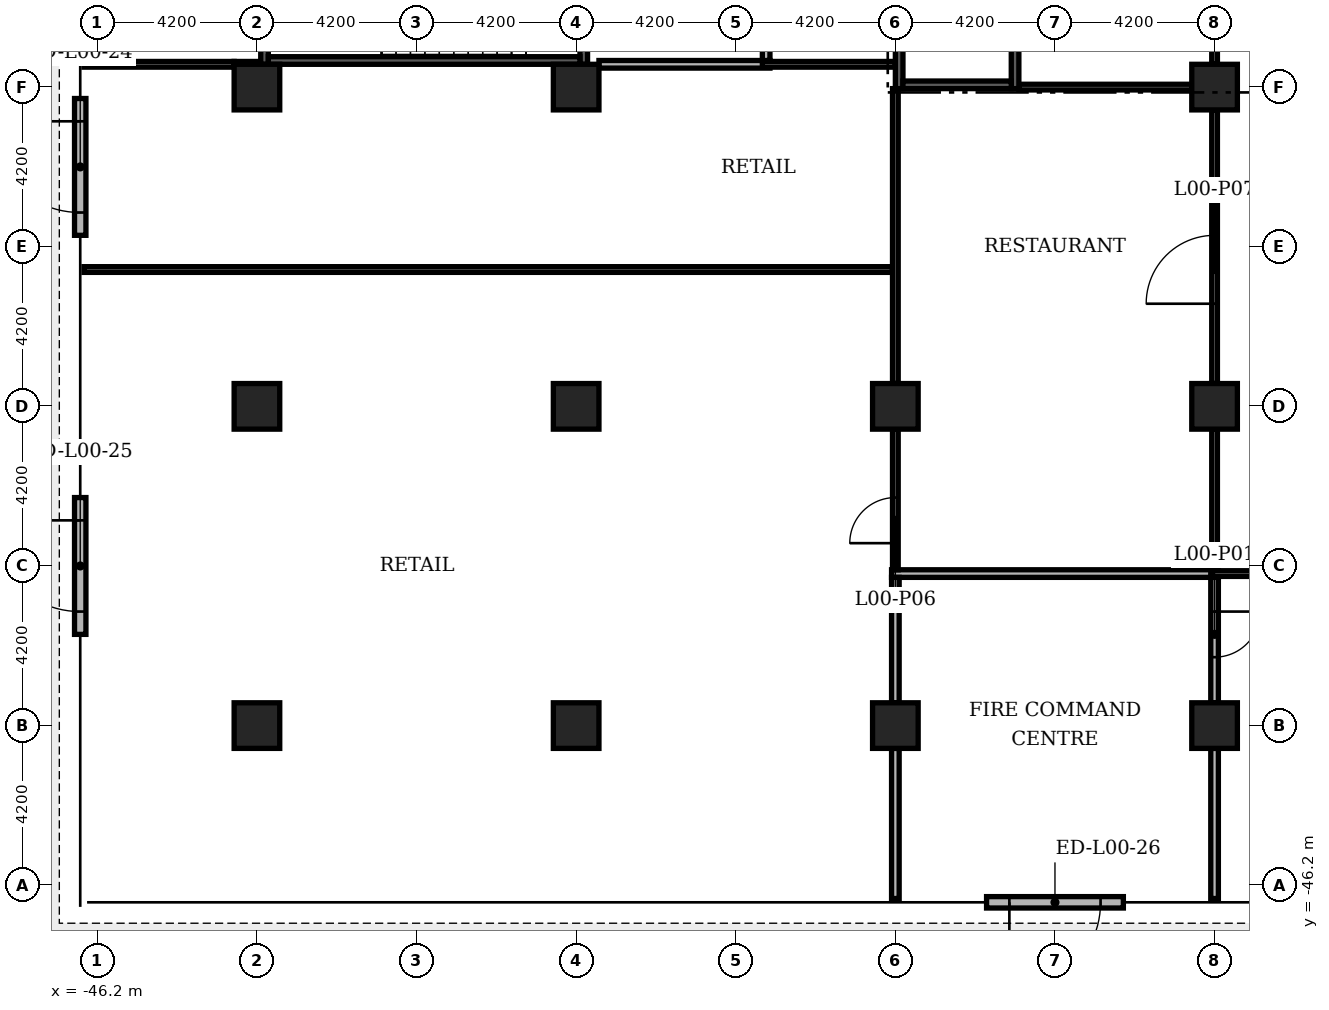
"""IFC4 building model, lengths in metres.
Left out: names, types, materials, properties, quantities, classifications, styles, units other than length and angle.
Written with IfcOpenShell. Run it as: python <this file> out.ifc"""

import sys

from ifc_helpers import new_model, si_unit, direction, frame, frame_2d, origin, origin_2d, place, context, subcontext, project, spatial, rectangle, extrude, element, fill, save


model = new_model("IFC4")
c1 = context("Model", 3, precision=1e-05, world=origin(), true_north=direction((0.0, 1.0)))
c2 = subcontext(c1, "Body", "Model", "MODEL_VIEW")
j1 = project(units=[si_unit("LENGTHUNIT", "METRE"), si_unit("PLANEANGLEUNIT", "RADIAN")], contexts=[c1])
p1 = place(None, origin())
s1 = spatial("IfcSite", under=j1, at=p1, CompositionType="ELEMENT")
p2 = place(p1, origin())
s2 = spatial("IfcBuilding", under=s1, at=p2, CompositionType="ELEMENT")
p3 = place(p2, origin())
s3 = spatial("IfcBuildingStorey", under=s2, at=p3, CompositionType="ELEMENT", Elevation=0.0)
for number, where, z_axis, x_axis in (
    (1, (-16.8, -25.2, 0.0), (0.0, 0.0, 1.0), (1.0, 0.0, 0.0)),
    (2, (-16.8, -33.6, 0.0), (0.0, 0.0, 1.0), (1.0, 0.0, 0.0)),
    (3, (-16.8, -42.0, 0.0), (0.0, 0.0, 1.0), (1.0, 0.0, 0.0)),
    (4, (-25.2, -33.6, 0.0), (0.0, 0.0, 1.0), (1.0, 0.0, 0.0)),
    (5, (-25.2, -42.0, 0.0), (0.0, 0.0, 1.0), (1.0, 0.0, 0.0)),
    (6, (-33.6, -25.2, 0.0), (0.0, 0.0, 1.0), (1.0, 0.0, 0.0)),
    (7, (-33.6, -33.6, 0.0), (0.0, 0.0, 1.0), (1.0, 0.0, 0.0)),
    (8, (-33.6, -42.0, 0.0), (0.0, 0.0, 1.0), (1.0, 0.0, 0.0)),
    (9, (-42.0, -25.2, 0.0), (0.0, 0.0, 1.0), (1.0, 0.0, 0.0)),
    (10, (-42.0, -33.6, 0.0), (0.0, 0.0, 1.0), (1.0, 0.0, 0.0)),
    (11, (-42.0, -42.0, 0.0), (0.0, 0.0, 1.0), (1.0, 0.0, 0.0)),
):
    element("IfcColumn", number, at=place(p3, frame(where, z_axis=z_axis, x_axis=x_axis)), inside=s3, PredefinedType="COLUMN", context=c2, shape_type="SweptSolid", body=[
        extrude(rectangle(XDim=1.2, YDim=1.2, at=origin_2d()), origin(), (0.0, 0.0, 1.0), 7.2),
    ])
p4 = place(p3, frame((-46.65, -25.5, 0.0), z_axis=(0.0, 0.0, 1.0), x_axis=(0.0, -1.0, 0.0)))
e12 = element("IfcWall", 12, at=p4, inside=s3, PredefinedType="STANDARD", context=c2, shape_type="SweptSolid", body=[
    extrude(rectangle(XDim=3.6, YDim=0.3, at=frame_2d((1.8, 0.0))), origin(), (0.0, 0.0, 1.0), 6.78),
])
p5 = place(p4, frame((0.6, 0.0, 0.0)))
e13 = element("IfcOpeningElement", 13, at=p5, cuts=e12, PredefinedType="OPENING", context=c2, shape_type="SweptSolid", body=[
    extrude(rectangle(XDim=2.4, YDim=2.4, at=frame_2d((1.2, 1.2))), frame((0.0, 0.16, 0.0), z_axis=(0.0, -1.0, 0.0), x_axis=(1.0, 0.0, 0.0)), (0.0, 0.0, 1.0), 0.32),
])
p6 = place(p3, frame((-46.65, -36.0, 0.0), z_axis=(0.0, 0.0, 1.0), x_axis=(0.0, -1.0, 0.0)))
e14 = element("IfcWall", 14, at=p6, inside=s3, PredefinedType="STANDARD", context=c2, shape_type="SweptSolid", body=[
    extrude(rectangle(XDim=3.6, YDim=0.3, at=frame_2d((1.8, 0.0))), origin(), (0.0, 0.0, 1.0), 6.78),
])
p7 = place(p6, frame((0.6, 0.0, 0.0)))
e15 = element("IfcOpeningElement", 15, at=p7, cuts=e14, PredefinedType="OPENING", context=c2, shape_type="SweptSolid", body=[
    extrude(rectangle(XDim=2.4, YDim=2.4, at=frame_2d((1.2, 1.2))), frame((0.0, 0.16, 0.0), z_axis=(0.0, -1.0, 0.0), x_axis=(1.0, 0.0, 0.0)), (0.0, 0.0, 1.0), 0.32),
])
p8 = place(p3, frame((-22.8, -46.65, 0.0), z_axis=(0.0, 0.0, 1.0), x_axis=(1.0, 0.0, 0.0)))
e16 = element("IfcWall", 16, at=p8, inside=s3, PredefinedType="STANDARD", context=c2, shape_type="SweptSolid", body=[
    extrude(rectangle(XDim=3.6, YDim=0.3, at=frame_2d((1.8, 0.0))), origin(), (0.0, 0.0, 1.0), 6.78),
])
p9 = place(p8, frame((0.6, 0.0, 0.0)))
e17 = element("IfcOpeningElement", 17, at=p9, cuts=e16, PredefinedType="OPENING", context=c2, shape_type="SweptSolid", body=[
    extrude(rectangle(XDim=2.4, YDim=2.4, at=frame_2d((1.2, 1.2))), frame((0.0, 0.16, 0.0), z_axis=(0.0, -1.0, 0.0), x_axis=(1.0, 0.0, 0.0)), (0.0, 0.0, 1.0), 0.32),
])
p10 = place(p3, frame((-25.3, -38.0, 0.0), z_axis=(0.0, 0.0, 1.0), x_axis=(1.0, 0.0, 0.0)))
e18 = element("IfcWall", 18, at=p10, inside=s3, PredefinedType="PARTITIONING", context=c2, shape_type="SweptSolid", body=[
    extrude(rectangle(XDim=8.6, YDim=0.2, at=frame_2d((4.3, 0.0))), origin(), (0.0, 0.0, 1.0), 6.38),
])
p11 = place(p3, frame((-16.9, -38.0, 0.0), z_axis=(0.0, 0.0, 1.0), x_axis=(1.0, 0.0, 0.0)))
e19 = element("IfcWall", 19, at=p11, inside=s3, PredefinedType="PARTITIONING", context=c2, shape_type="SweptSolid", body=[
    extrude(rectangle(XDim=33.625, YDim=0.15, at=frame_2d((16.812, 0.0))), origin(), (0.0, 0.0, 1.0), 6.38),
])
p12 = place(p11, frame((7.7, 0.0, 0.0)))
e20 = element("IfcOpeningElement", 20, at=p12, cuts=e19, PredefinedType="OPENING", context=c2, shape_type="SweptSolid", body=[
    extrude(rectangle(XDim=2.4, YDim=2.4, at=frame_2d((1.2, 1.2))), frame((0.0, 0.085, 0.0), z_axis=(0.0, -1.0, 0.0), x_axis=(1.0, 0.0, 0.0)), (0.0, 0.0, 1.0), 0.17),
])
p13 = place(p11, frame((15.7, 0.0, 0.0)))
e21 = element("IfcOpeningElement", 21, at=p13, cuts=e19, PredefinedType="OPENING", context=c2, shape_type="SweptSolid", body=[
    extrude(rectangle(XDim=2.4, YDim=2.4, at=frame_2d((1.2, 1.2))), frame((0.0, 0.085, 0.0), z_axis=(0.0, -1.0, 0.0), x_axis=(1.0, 0.0, 0.0)), (0.0, 0.0, 1.0), 0.17),
])
p14 = place(p11, frame((23.7, 0.0, 0.0)))
e22 = element("IfcOpeningElement", 22, at=p14, cuts=e19, PredefinedType="OPENING", context=c2, shape_type="SweptSolid", body=[
    extrude(rectangle(XDim=2.4, YDim=2.4, at=frame_2d((1.2, 1.2))), frame((0.0, 0.085, 0.0), z_axis=(0.0, -1.0, 0.0), x_axis=(1.0, 0.0, 0.0)), (0.0, 0.0, 1.0), 0.17),
])
p15 = place(p3, frame((-46.55, -30.0, 0.0), z_axis=(0.0, 0.0, 1.0), x_axis=(1.0, 0.0, 0.0)))
e23 = element("IfcWall", 23, at=p15, inside=s3, PredefinedType="PARTITIONING", context=c2, shape_type="SweptSolid", body=[
    extrude(rectangle(XDim=21.275, YDim=0.15, at=frame_2d((10.638, 0.0))), origin(), (0.0, 0.0, 1.0), 6.38),
])
p16 = place(p3, frame((-21.95, -25.2, 0.0), z_axis=(0.0, 0.0, 1.0), x_axis=(1.0, 0.0, 0.0)))
e24 = element("IfcWall", 24, at=p16, inside=s3, PredefinedType="PARTITIONING", context=c2, shape_type="SweptSolid", body=[
    extrude(rectangle(XDim=4.55, YDim=0.15, at=frame_2d((2.275, 0.0))), origin(), (0.0, 0.0, 1.0), 6.48),
])
p17 = place(p3, frame((-46.55, -24.6, 0.0), z_axis=(0.0, 0.0, 1.0), x_axis=(1.0, 0.0, 0.0)))
e25 = element("IfcWall", 25, at=p17, inside=s3, PredefinedType="PARTITIONING", context=c2, shape_type="SweptSolid", body=[
    extrude(rectangle(XDim=3.95, YDim=0.15, at=frame_2d((1.975, 0.0))), origin(), (0.0, 0.0, 1.0), 6.78),
])
p18 = place(p3, frame((-42.6, -24.6, 0.0), z_axis=(0.0, 0.0, 1.0), x_axis=(1.0, 0.0, 0.0)))
e26 = element("IfcWall", 26, at=p18, inside=s3, PredefinedType="PARTITIONING", context=c2, shape_type="SweptSolid", body=[
    extrude(rectangle(XDim=0.7, YDim=0.15, at=frame_2d((0.35, 0.0))), origin(), (0.0, 0.0, 1.0), 6.78),
])
p19 = place(p3, frame((-33.0, -24.6, 0.0), z_axis=(0.0, 0.0, 1.0), x_axis=(1.0, 0.0, 0.0)))
e27 = element("IfcWall", 27, at=p19, inside=s3, PredefinedType="PARTITIONING", context=c2, shape_type="SweptSolid", body=[
    extrude(rectangle(XDim=4.5, YDim=0.2, at=frame_2d((2.25, 0.0))), origin(), (0.0, 0.0, 1.0), 6.78),
])
p20 = place(p3, frame((-28.7, -24.6, 0.0), z_axis=(0.0, 0.0, 1.0), x_axis=(1.0, 0.0, 0.0)))
e28 = element("IfcWall", 28, at=p20, inside=s3, PredefinedType="PARTITIONING", context=c2, shape_type="SweptSolid", body=[
    extrude(rectangle(XDim=3.5, YDim=0.15, at=frame_2d((1.75, 0.0))), origin(), (0.0, 0.0, 1.0), 6.78),
])
p21 = place(p3, frame((-28.6, -24.5, 0.0), z_axis=(0.0, 0.0, 1.0), x_axis=(0.0, 1.0, 0.0)))
e29 = element("IfcWall", 29, at=p21, inside=s3, PredefinedType="PARTITIONING", context=c2, shape_type="SweptSolid", body=[
    extrude(rectangle(XDim=3.95, YDim=0.2, at=frame_2d((1.975, 0.0))), origin(), (0.0, 0.0, 1.0), 6.78),
])
p22 = place(p3, frame((-25.2, -46.55, 0.0), z_axis=(0.0, 0.0, 1.0), x_axis=(0.0, 1.0, 0.0)))
e30 = element("IfcWall", 30, at=p22, inside=s3, PredefinedType="PARTITIONING", context=c2, shape_type="SweptSolid", body=[
    extrude(rectangle(XDim=3.95, YDim=0.2, at=frame_2d((1.975, 0.0))), origin(), (0.0, 0.0, 1.0), 6.38),
])
p23 = place(p3, frame((-25.2, -41.4, 0.0), z_axis=(0.0, 0.0, 1.0), x_axis=(0.0, 1.0, 0.0)))
e31 = element("IfcWall", 31, at=p23, inside=s3, PredefinedType="PARTITIONING", context=c2, shape_type="SweptSolid", body=[
    extrude(rectangle(XDim=3.3, YDim=0.2, at=frame_2d((1.65, 0.0))), origin(), (0.0, 0.0, 1.0), 6.38),
])
p24 = place(p3, frame((-25.2, -37.9, 0.0), z_axis=(0.0, 0.0, 1.0), x_axis=(0.0, 1.0, 0.0)))
e32 = element("IfcWall", 32, at=p24, inside=s3, PredefinedType="PARTITIONING", context=c2, shape_type="SweptSolid", body=[
    extrude(rectangle(XDim=3.7, YDim=0.15, at=frame_2d((1.85, 0.0))), origin(), (0.0, 0.0, 1.0), 6.38),
])
p25 = place(p24, frame((0.7, 0.0, 0.0)))
e33 = element("IfcOpeningElement", 33, at=p25, cuts=e32, PredefinedType="OPENING", context=c2, shape_type="SweptSolid", body=[
    extrude(rectangle(XDim=1.2, YDim=2.2, at=frame_2d((0.6, 1.1))), frame((0.0, 0.085, 0.0), z_axis=(0.0, -1.0, 0.0), x_axis=(1.0, 0.0, 0.0)), (0.0, 0.0, 1.0), 0.17),
])
p26 = place(p3, frame((-25.2, -33.0, 0.0), z_axis=(0.0, 0.0, 1.0), x_axis=(0.0, 1.0, 0.0)))
e34 = element("IfcWall", 34, at=p26, inside=s3, PredefinedType="PARTITIONING", context=c2, shape_type="SweptSolid", body=[
    extrude(rectangle(XDim=7.76, YDim=0.15, at=frame_2d((3.88, 0.0))), origin(), (0.0, 0.0, 1.0), 6.38),
])
p27 = place(p3, frame((-16.8, -46.55, 0.0), z_axis=(0.0, 0.0, 1.0), x_axis=(0.0, 1.0, 0.0)))
e35 = element("IfcWall", 35, at=p27, inside=s3, PredefinedType="PARTITIONING", context=c2, shape_type="SweptSolid", body=[
    extrude(rectangle(XDim=3.95, YDim=0.2, at=frame_2d((1.975, 0.0))), origin(), (0.0, 0.0, 1.0), 6.38),
])
p28 = place(p3, frame((-16.8, -41.4, 0.0), z_axis=(0.0, 0.0, 1.0), x_axis=(0.0, 1.0, 0.0)))
e36 = element("IfcWall", 36, at=p28, inside=s3, PredefinedType="PARTITIONING", context=c2, shape_type="SweptSolid", body=[
    extrude(rectangle(XDim=3.3, YDim=0.2, at=frame_2d((1.65, 0.0))), origin(), (0.0, 0.0, 1.0), 6.38),
])
p29 = place(p28, frame((1.2, 0.0, 0.0)))
e37 = element("IfcOpeningElement", 37, at=p29, cuts=e36, PredefinedType="OPENING", context=c2, shape_type="SweptSolid", body=[
    extrude(rectangle(XDim=1.2, YDim=2.2, at=frame_2d((0.6, 1.1))), frame((0.0, 0.11, 0.0), z_axis=(0.0, -1.0, 0.0), x_axis=(1.0, 0.0, 0.0)), (0.0, 0.0, 1.0), 0.22),
])
p30 = place(p3, frame((-16.8, -37.9, 0.0), z_axis=(0.0, 0.0, 1.0), x_axis=(0.0, 1.0, 0.0)))
e38 = element("IfcWall", 38, at=p30, inside=s3, PredefinedType="PARTITIONING", context=c2, shape_type="SweptSolid", body=[
    extrude(rectangle(XDim=3.7, YDim=0.15, at=frame_2d((1.85, 0.0))), origin(), (0.0, 0.0, 1.0), 6.38),
])
p31 = place(p3, frame((-16.8, -33.0, 0.0), z_axis=(0.0, 0.0, 1.0), x_axis=(0.0, 1.0, 0.0)))
e39 = element("IfcWall", 39, at=p31, inside=s3, PredefinedType="PARTITIONING", context=c2, shape_type="SweptSolid", body=[
    extrude(rectangle(XDim=7.2, YDim=0.15, at=frame_2d((3.6, 0.0))), origin(), (0.0, 0.0, 1.0), 6.38),
])
p32 = place(p31, frame((2.1, 0.0, 0.0)))
e40 = element("IfcOpeningElement", 40, at=p32, cuts=e39, PredefinedType="OPENING", context=c2, shape_type="SweptSolid", body=[
    extrude(rectangle(XDim=1.8, YDim=2.2, at=frame_2d((0.9, 1.1))), frame((0.0, 0.085, 0.0), z_axis=(0.0, -1.0, 0.0), x_axis=(1.0, 0.0, 0.0)), (0.0, 0.0, 1.0), 0.17),
])
p33 = place(p3, frame((-16.8, -24.6, 0.0), z_axis=(0.0, 0.0, 1.0), x_axis=(0.0, 1.0, 0.0)))
e41 = element("IfcWall", 41, at=p33, inside=s3, PredefinedType="PARTITIONING", context=c2, shape_type="SweptSolid", body=[
    extrude(rectangle(XDim=7.5, YDim=0.15, at=frame_2d((3.75, 0.0))), origin(), (0.0, 0.0, 1.0), 6.78),
])
p34 = place(p3, frame((-25.1, -25.24, 0.0), z_axis=(0.0, 0.0, 1.0), x_axis=(0.0, 1.0, 0.0)))
e42 = element("IfcWall", 42, at=p34, inside=s3, PredefinedType="SOLIDWALL", context=c2, shape_type="SweptSolid", body=[
    extrude(rectangle(XDim=6.74, YDim=0.2, at=frame_2d((3.37, 0.0))), origin(), (0.0, 0.0, 1.0), 6.38),
])
p35 = place(p3, frame((-22.05, -25.24, 0.0), z_axis=(0.0, 0.0, 1.0), x_axis=(0.0, 1.0, 0.0)))
e43 = element("IfcWall", 43, at=p35, inside=s3, PredefinedType="SOLIDWALL", context=c2, shape_type="SweptSolid", body=[
    extrude(rectangle(XDim=6.74, YDim=0.2, at=frame_2d((3.37, 0.0))), origin(), (0.0, 0.0, 1.0), 6.78),
])
p36 = place(p3, frame((-25.0, -25.14, 0.0), z_axis=(0.0, 0.0, 1.0), x_axis=(1.0, 0.0, 0.0)))
e44 = element("IfcWall", 44, at=p36, inside=s3, PredefinedType="SOLIDWALL", context=c2, shape_type="SweptSolid", body=[
    extrude(rectangle(XDim=2.85, YDim=0.2, at=frame_2d((1.425, 0.0))), origin(), (0.0, 0.0, 1.0), 6.48),
])
p37 = place(p3, frame((-41.8, -24.6, 0.0), z_axis=(0.0, 0.0, 1.0), x_axis=(0.0, 1.0, 0.0)))
e45 = element("IfcWall", 45, at=p37, inside=s3, PredefinedType="SOLIDWALL", context=c2, shape_type="SweptSolid", body=[
    extrude(rectangle(XDim=4.15, YDim=0.2, at=frame_2d((2.075, 0.0))), origin(), (0.0, 0.0, 1.0), 6.38),
])
p38 = place(p3, frame((-33.4, -24.6, 0.0), z_axis=(0.0, 0.0, 1.0), x_axis=(0.0, 1.0, 0.0)))
e46 = element("IfcWall", 46, at=p38, inside=s3, PredefinedType="SOLIDWALL", context=c2, shape_type="SweptSolid", body=[
    extrude(rectangle(XDim=4.15, YDim=0.2, at=frame_2d((2.075, 0.0))), origin(), (0.0, 0.0, 1.0), 6.38),
])
p39 = place(p38, frame((1.175, 0.0, 0.0)))
e47 = element("IfcOpeningElement", 47, at=p39, cuts=e46, PredefinedType="OPENING", context=c2, shape_type="SweptSolid", body=[
    extrude(rectangle(XDim=1.8, YDim=2.2, at=frame_2d((0.9, 1.1))), frame((0.0, 0.11, 0.0), z_axis=(0.0, -1.0, 0.0), x_axis=(1.0, 0.0, 0.0)), (0.0, 0.0, 1.0), 0.22),
])
p40 = place(p3, frame((-41.7, -24.5, 0.0), z_axis=(0.0, 0.0, 1.0), x_axis=(1.0, 0.0, 0.0)))
e48 = element("IfcWall", 48, at=p40, inside=s3, PredefinedType="SOLIDWALL", context=c2, shape_type="SweptSolid", body=[
    extrude(rectangle(XDim=8.2, YDim=0.2, at=frame_2d((4.1, 0.0))), origin(), (0.0, 0.0, 1.0), 7.0),
])
p41 = place(p5, frame((2.4, 0.0, 0.0), z_axis=(0.0, 0.0, 1.0), x_axis=(-1.0, 0.0, 0.0)))
e49 = element("IfcDoor", 49, at=p41, inside=s3, OperationType="DOUBLE_DOOR_SINGLE_SWING", PredefinedType="DOOR", context=c2, shape_type="SweptSolid", body=[
    extrude(rectangle(XDim=2.4, YDim=2.4, at=frame_2d((1.2, 1.2))), frame((0.0, 0.025, 0.0), z_axis=(0.0, -1.0, 0.0), x_axis=(1.0, 0.0, 0.0)), (0.0, 0.0, 1.0), 0.05),
])
fill(e13, e49)
p42 = place(p7, frame((2.4, 0.0, 0.0), z_axis=(0.0, 0.0, 1.0), x_axis=(-1.0, 0.0, 0.0)))
e50 = element("IfcDoor", 50, at=p42, inside=s3, OperationType="DOUBLE_DOOR_SINGLE_SWING", PredefinedType="DOOR", context=c2, shape_type="SweptSolid", body=[
    extrude(rectangle(XDim=2.4, YDim=2.4, at=frame_2d((1.2, 1.2))), frame((0.0, 0.025, 0.0), z_axis=(0.0, -1.0, 0.0), x_axis=(1.0, 0.0, 0.0)), (0.0, 0.0, 1.0), 0.05),
])
fill(e15, e50)
p43 = place(p9, frame((2.4, 0.0, 0.0), z_axis=(0.0, 0.0, 1.0), x_axis=(-1.0, 0.0, 0.0)))
e51 = element("IfcDoor", 51, at=p43, inside=s3, OperationType="DOUBLE_DOOR_SINGLE_SWING", PredefinedType="DOOR", context=c2, shape_type="SweptSolid", body=[
    extrude(rectangle(XDim=2.4, YDim=2.4, at=frame_2d((1.2, 1.2))), frame((0.0, 0.025, 0.0), z_axis=(0.0, -1.0, 0.0), x_axis=(1.0, 0.0, 0.0)), (0.0, 0.0, 1.0), 0.05),
])
fill(e17, e51)
p44 = place(p29, origin())
e52 = element("IfcDoor", 52, at=p44, inside=s3, OperationType="SINGLE_SWING_RIGHT", PredefinedType="DOOR", context=c2, shape_type="SweptSolid", body=[
    extrude(rectangle(XDim=1.2, YDim=2.2, at=frame_2d((0.6, 1.1))), frame((0.0, 0.025, 0.0), z_axis=(0.0, -1.0, 0.0), x_axis=(1.0, 0.0, 0.0)), (0.0, 0.0, 1.0), 0.05),
])
fill(e37, e52)
p45 = place(p25, origin())
e53 = element("IfcDoor", 53, at=p45, inside=s3, OperationType="SINGLE_SWING_LEFT", PredefinedType="DOOR", context=c2, shape_type="SweptSolid", body=[
    extrude(rectangle(XDim=1.2, YDim=2.2, at=frame_2d((0.6, 1.1))), frame((0.0, 0.025, 0.0), z_axis=(0.0, -1.0, 0.0), x_axis=(1.0, 0.0, 0.0)), (0.0, 0.0, 1.0), 0.05),
])
fill(e33, e53)
p46 = place(p32, origin())
e54 = element("IfcDoor", 54, at=p46, inside=s3, OperationType="DOUBLE_DOOR_SINGLE_SWING", PredefinedType="DOOR", context=c2, shape_type="SweptSolid", body=[
    extrude(rectangle(XDim=1.8, YDim=2.2, at=frame_2d((0.9, 1.1))), frame((0.0, 0.025, 0.0), z_axis=(0.0, -1.0, 0.0), x_axis=(1.0, 0.0, 0.0)), (0.0, 0.0, 1.0), 0.05),
])
fill(e40, e54)
save(model, sys.argv[1])
